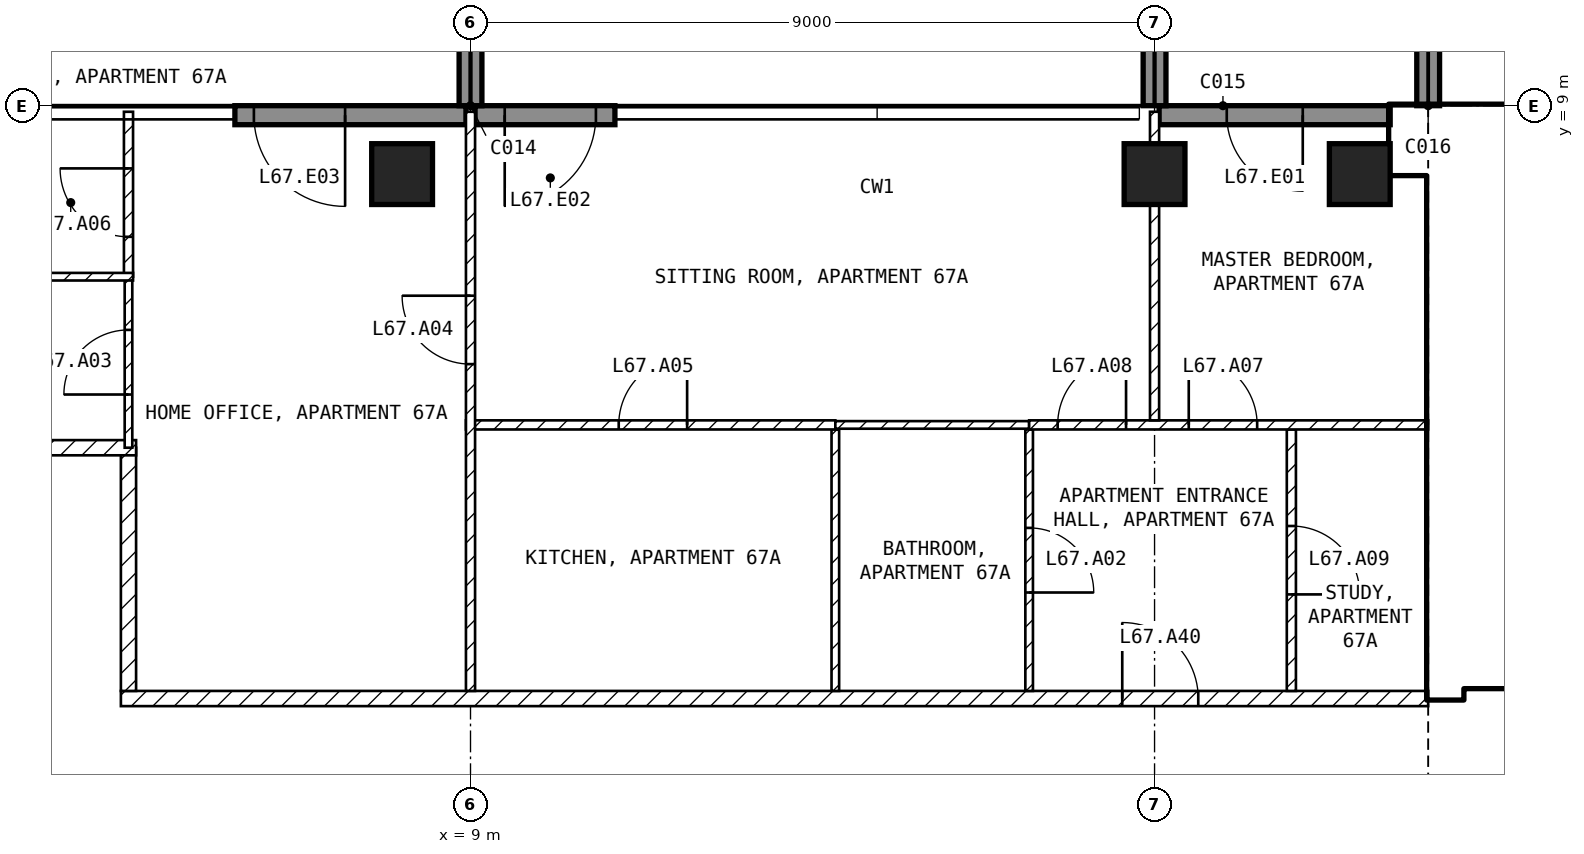
"""IFC4 building model, lengths in metres.
Left out: names, types, materials, properties, quantities, classifications, styles, units other than length and angle.
Written with IfcOpenShell. Run it as: python <this file> out.ifc"""

import sys

from ifc_helpers import new_model, si_unit, direction, frame, frame_2d, origin, origin_2d, place, context, subcontext, project, spatial, rectangle, extrude, element, fill, save


model = new_model("IFC4")
c1 = context("Model", 3, precision=1e-05, world=origin(), true_north=direction((0.0, 1.0)))
c2 = subcontext(c1, "Body", "Model", "MODEL_VIEW")
j1 = project(units=[si_unit("LENGTHUNIT", "METRE"), si_unit("PLANEANGLEUNIT", "RADIAN")], contexts=[c1])
p1 = place(None, origin())
s1 = spatial("IfcSite", under=j1, at=p1, CompositionType="ELEMENT")
p2 = place(p1, origin())
s2 = spatial("IfcBuilding", under=s1, at=p2, CompositionType="ELEMENT")
p3 = place(p2, frame((0.0, 0.0, 264.0)))
s3 = spatial("IfcBuildingStorey", under=s2, at=p3, CompositionType="ELEMENT", Elevation=264.0)
for number, where, z_axis, x_axis in (
    (1, (8.1, 8.1, -0.25), (0.0, 0.0, 1.0), (1.0, 0.0, 0.0)),
    (2, (18.0, 8.1, -0.25), (0.0, 0.0, 1.0), (1.0, 0.0, 0.0)),
    (3, (20.7, 8.1, -0.25), (0.0, 0.0, 1.0), (1.0, 0.0, 0.0)),
):
    element("IfcColumn", number, at=place(p3, frame(where, z_axis=z_axis, x_axis=x_axis)), inside=s3, PredefinedType="COLUMN", context=c2, shape_type="SweptSolid", body=[
        extrude(rectangle(XDim=0.8, YDim=0.8, at=origin_2d()), origin(), (0.0, 0.0, 1.0), 3.5),
    ])
p4 = place(p3, frame((21.1, 8.875, 0.0), z_axis=(0.0, 0.0, 1.0), x_axis=(-1.0, 0.0, 0.0)))
e4 = element("IfcWall", 4, at=p4, inside=s3, PredefinedType="SOLIDWALL", context=c2, shape_type="SweptSolid", body=[
    extrude(rectangle(XDim=3.04, YDim=0.25, at=frame_2d((1.52, 0.0))), origin(), (0.0, 0.0, 1.0), 3.25),
])
p5 = place(p4, frame((1.15, 0.0, 0.0)))
e5 = element("IfcOpeningElement", 5, at=p5, cuts=e4, PredefinedType="OPENING", context=c2, shape_type="SweptSolid", body=[
    extrude(rectangle(XDim=1.0, YDim=2.4, at=frame_2d((0.5, 1.2))), frame((0.0, 0.135, 0.0), z_axis=(0.0, -1.0, 0.0), x_axis=(1.0, 0.0, 0.0)), (0.0, 0.0, 1.0), 0.27),
])
p6 = place(p3, frame((10.9, 8.875, 0.0), z_axis=(0.0, 0.0, 1.0), x_axis=(-1.0, 0.0, 0.0)))
e6 = element("IfcWall", 6, at=p6, inside=s3, PredefinedType="SOLIDWALL", context=c2, shape_type="SweptSolid", body=[
    extrude(rectangle(XDim=1.84, YDim=0.25, at=frame_2d((0.92, 0.0))), origin(), (0.0, 0.0, 1.0), 3.25),
])
p7 = place(p6, frame((0.25, 0.0, 0.0)))
e7 = element("IfcOpeningElement", 7, at=p7, cuts=e6, PredefinedType="OPENING", context=c2, shape_type="SweptSolid", body=[
    extrude(rectangle(XDim=1.2, YDim=2.4, at=frame_2d((0.6, 1.2))), frame((0.0, 0.135, 0.0), z_axis=(0.0, -1.0, 0.0), x_axis=(1.0, 0.0, 0.0)), (0.0, 0.0, 1.0), 0.27),
])
p8 = place(p3, frame((8.94, 8.875, 0.0), z_axis=(0.0, 0.0, 1.0), x_axis=(-1.0, 0.0, 0.0)))
e8 = element("IfcWall", 8, at=p8, inside=s3, PredefinedType="SOLIDWALL", context=c2, shape_type="SweptSolid", body=[
    extrude(rectangle(XDim=3.04, YDim=0.25, at=frame_2d((1.52, 0.0))), origin(), (0.0, 0.0, 1.0), 3.25),
])
p9 = place(p8, frame((1.59, 0.0, 0.0)))
e9 = element("IfcOpeningElement", 9, at=p9, cuts=e8, PredefinedType="OPENING", context=c2, shape_type="SweptSolid", body=[
    extrude(rectangle(XDim=1.2, YDim=2.4, at=frame_2d((0.6, 1.2))), frame((0.0, 0.135, 0.0), z_axis=(0.0, -1.0, 0.0), x_axis=(1.0, 0.0, 0.0)), (0.0, 0.0, 1.0), 0.27),
])
for number, where, z_axis, x_axis in (
    (10, (9.0, 9.0, 0.0), (0.0, 0.0, 1.0), (0.0, 1.0, 0.0)),
    (11, (18.0, 9.0, 0.0), (0.0, 0.0, 1.0), (0.0, 1.0, 0.0)),
    (12, (21.6, 9.0, 0.0), (0.0, 0.0, 1.0), (0.0, 1.0, 0.0)),
):
    element("IfcWall", number, at=place(p3, frame(where, z_axis=z_axis, x_axis=x_axis)), inside=s3, PredefinedType="SOLIDWALL", context=c2, shape_type="SweptSolid", body=[
        extrude(rectangle(XDim=2.7, YDim=0.3, at=frame_2d((1.35, 0.0))), origin(), (0.0, 0.0, 1.0), 3.25),
    ])
p10 = place(p3, frame((21.1, 8.55, 0.0), z_axis=(0.0, 0.0, 1.0), x_axis=(1.0, 0.0, 0.0)))
e13 = element("IfcWall", 13, at=p10, inside=s3, PredefinedType="SHEAR", context=c2, shape_type="SweptSolid", body=[
    extrude(rectangle(XDim=8.65, YDim=0.9, at=frame_2d((4.325, 0.0))), origin(), (0.0, 0.0, 1.0), 3.25),
])
p11 = place(p3, frame((21.825, 1.2, 0.0), z_axis=(0.0, 0.0, 1.0), x_axis=(0.0, 1.0, 0.0)))
e14 = element("IfcWall", 14, at=p11, inside=s3, PredefinedType="SHEAR", context=c2, shape_type="SweptSolid", body=[
    extrude(rectangle(XDim=6.9, YDim=0.45, at=frame_2d((3.45, 0.0))), origin(), (0.0, 0.0, 1.0), 3.25),
])
p12 = place(p3, frame((22.05, 1.45, 0.0), z_axis=(0.0, 0.0, 1.0), x_axis=(1.0, 0.0, 0.0)))
e15 = element("IfcWall", 15, at=p12, inside=s3, PredefinedType="SOLIDWALL", context=c2, shape_type="SweptSolid", body=[
    extrude(rectangle(XDim=11.3, YDim=0.2, at=frame_2d((5.65, 0.0))), origin(), (0.0, 0.0, 1.0), 3.25),
])
p13 = place(p12, frame((0.75, 0.0, 0.0)))
e16 = element("IfcOpeningElement", 16, at=p13, cuts=e15, PredefinedType="OPENING", context=c2, shape_type="SweptSolid", body=[
    extrude(rectangle(XDim=1.0, YDim=2.1, at=frame_2d((0.5, 1.05))), frame((0.0, 0.11, 0.0), z_axis=(0.0, -1.0, 0.0), x_axis=(1.0, 0.0, 0.0)), (0.0, 0.0, 1.0), 0.22),
])
p14 = place(p12, frame((3.25, 0.0, 0.0)))
e17 = element("IfcOpeningElement", 17, at=p14, cuts=e15, PredefinedType="OPENING", context=c2, shape_type="SweptSolid", body=[
    extrude(rectangle(XDim=1.0, YDim=2.1, at=frame_2d((0.5, 1.05))), frame((0.0, 0.11, 0.0), z_axis=(0.0, -1.0, 0.0), x_axis=(1.0, 0.0, 0.0)), (0.0, 0.0, 1.0), 0.22),
])
p15 = place(p12, frame((9.225, 0.0, 0.0)))
e18 = element("IfcOpeningElement", 18, at=p15, cuts=e15, PredefinedType="OPENING", context=c2, shape_type="SweptSolid", body=[
    extrude(rectangle(XDim=0.9, YDim=2.1, at=frame_2d((0.45, 1.05))), frame((0.0, 0.11, 0.0), z_axis=(0.0, -1.0, 0.0), x_axis=(1.0, 0.0, 0.0)), (0.0, 0.0, 1.0), 0.22),
])
p16 = place(p3, frame((22.05, 5.15, 0.0), z_axis=(0.0, 0.0, 1.0), x_axis=(1.0, 0.0, 0.0)))
e19 = element("IfcWall", 19, at=p16, inside=s3, PredefinedType="SOLIDWALL", context=c2, shape_type="SweptSolid", body=[
    extrude(rectangle(XDim=6.3, YDim=0.2, at=frame_2d((3.15, 0.0))), origin(), (0.0, 0.0, 1.0), 3.25),
])
p17 = place(p16, frame((0.2, 0.0, 0.0)))
e20 = element("IfcOpeningElement", 20, at=p17, cuts=e19, PredefinedType="OPENING", context=c2, shape_type="SweptSolid", body=[
    extrude(rectangle(XDim=1.0, YDim=2.1, at=frame_2d((0.5, 1.05))), frame((0.0, 0.11, 0.0), z_axis=(0.0, -1.0, 0.0), x_axis=(1.0, 0.0, 0.0)), (0.0, 0.0, 1.0), 0.22),
])
p18 = place(p3, frame((4.4, 1.2, 0.0), z_axis=(0.0, 0.0, 1.0), x_axis=(1.0, 0.0, 0.0)))
e21 = element("IfcWall", 21, at=p18, inside=s3, PredefinedType="PARTITIONING", context=c2, shape_type="SweptSolid", body=[
    extrude(rectangle(XDim=17.2, YDim=0.2, at=frame_2d((8.6, 0.0))), origin(), (0.0, 0.0, 1.0), 3.25),
])
p19 = place(p18, frame((13.175, 0.0, 0.0)))
e22 = element("IfcOpeningElement", 22, at=p19, cuts=e21, PredefinedType="OPENING", context=c2, shape_type="SweptSolid", body=[
    extrude(rectangle(XDim=1.0, YDim=2.1, at=frame_2d((0.5, 1.05))), frame((0.0, 0.11, 0.0), z_axis=(0.0, -1.0, 0.0), x_axis=(1.0, 0.0, 0.0)), (0.0, 0.0, 1.0), 0.22),
])
p20 = place(p3, frame((4.5, 4.5, 0.0), z_axis=(0.0, 0.0, 1.0), x_axis=(0.0, -1.0, 0.0)))
e23 = element("IfcWall", 23, at=p20, inside=s3, PredefinedType="PARTITIONING", context=c2, shape_type="SweptSolid", body=[
    extrude(rectangle(XDim=3.2, YDim=0.2, at=frame_2d((1.6, 0.0))), origin(), (0.0, 0.0, 1.0), 3.25),
])
p21 = place(p3, frame((1.1, 4.5, 0.0), z_axis=(0.0, 0.0, 1.0), x_axis=(1.0, 0.0, 0.0)))
e24 = element("IfcWall", 24, at=p21, inside=s3, PredefinedType="PARTITIONING", context=c2, shape_type="SweptSolid", body=[
    extrude(rectangle(XDim=3.5, YDim=0.2, at=frame_2d((1.75, 0.0))), origin(), (0.0, 0.0, 1.0), 3.25),
])
p22 = place(p3, frame((13.8, 4.74, 0.0), z_axis=(0.0, 0.0, 1.0), x_axis=(0.0, -1.0, 0.0)))
e25 = element("IfcWall", 25, at=p22, inside=s3, PredefinedType="PARTITIONING", context=c2, shape_type="SweptSolid", body=[
    extrude(rectangle(XDim=3.44, YDim=0.1, at=frame_2d((1.72, 0.0))), origin(), (0.0, 0.0, 1.0), 3.25),
])
p23 = place(p3, frame((8.94, 4.8, 0.0), z_axis=(0.0, 0.0, 1.0), x_axis=(1.0, 0.0, 0.0)))
e26 = element("IfcWall", 26, at=p23, inside=s3, PredefinedType="PARTITIONING", context=c2, shape_type="SweptSolid", body=[
    extrude(rectangle(XDim=4.86, YDim=0.12, at=frame_2d((2.43, 0.0))), origin(), (0.0, 0.0, 1.0), 3.25),
])
p24 = place(p23, frame((2.01, 0.0, 0.0)))
e27 = element("IfcOpeningElement", 27, at=p24, cuts=e26, PredefinedType="OPENING", context=c2, shape_type="SweptSolid", body=[
    extrude(rectangle(XDim=0.9, YDim=2.1, at=frame_2d((0.45, 1.05))), frame((0.0, 0.07, 0.0), z_axis=(0.0, -1.0, 0.0), x_axis=(1.0, 0.0, 0.0)), (0.0, 0.0, 1.0), 0.14),
])
p25 = place(p3, frame((9.0, 1.3, 0.0), z_axis=(0.0, 0.0, 1.0), x_axis=(0.0, 1.0, 0.0)))
e28 = element("IfcWall", 28, at=p25, inside=s3, PredefinedType="PARTITIONING", context=c2, shape_type="SweptSolid", body=[
    extrude(rectangle(XDim=7.62, YDim=0.12, at=frame_2d((3.81, 0.0))), origin(), (0.0, 0.0, 1.0), 3.25),
])
p26 = place(p25, frame((4.3, 0.0, 0.0)))
e29 = element("IfcOpeningElement", 29, at=p26, cuts=e28, PredefinedType="OPENING", context=c2, shape_type="SweptSolid", body=[
    extrude(rectangle(XDim=0.9, YDim=2.1, at=frame_2d((0.45, 1.05))), frame((0.0, 0.07, 0.0), z_axis=(0.0, -1.0, 0.0), x_axis=(1.0, 0.0, 0.0)), (0.0, 0.0, 1.0), 0.14),
])
p27 = place(p3, frame((16.35, 4.74, 0.0), z_axis=(0.0, 0.0, 1.0), x_axis=(0.0, -1.0, 0.0)))
e30 = element("IfcWall", 30, at=p27, inside=s3, PredefinedType="PARTITIONING", context=c2, shape_type="SweptSolid", body=[
    extrude(rectangle(XDim=3.44, YDim=0.1, at=frame_2d((1.72, 0.0))), origin(), (0.0, 0.0, 1.0), 3.25),
])
p28 = place(p27, frame((1.295, 0.0, 0.0)))
e31 = element("IfcOpeningElement", 31, at=p28, cuts=e30, PredefinedType="OPENING", context=c2, shape_type="SweptSolid", body=[
    extrude(rectangle(XDim=0.85, YDim=2.1, at=frame_2d((0.425, 1.05))), frame((0.0, 0.06, 0.0), z_axis=(0.0, -1.0, 0.0), x_axis=(1.0, 0.0, 0.0)), (0.0, 0.0, 1.0), 0.12),
])
p29 = place(p3, frame((13.8, 4.8, 0.0), z_axis=(0.0, 0.0, 1.0), x_axis=(1.0, 0.0, 0.0)))
e32 = element("IfcWall", 32, at=p29, inside=s3, PredefinedType="PARTITIONING", context=c2, shape_type="SweptSolid", body=[
    extrude(rectangle(XDim=2.55, YDim=0.1, at=frame_2d((1.275, 0.0))), origin(), (0.0, 0.0, 1.0), 3.25),
])
p30 = place(p3, frame((19.8, 4.74, 0.0), z_axis=(0.0, 0.0, 1.0), x_axis=(0.0, -1.0, 0.0)))
e33 = element("IfcWall", 33, at=p30, inside=s3, PredefinedType="PARTITIONING", context=c2, shape_type="SweptSolid", body=[
    extrude(rectangle(XDim=3.44, YDim=0.12, at=frame_2d((1.72, 0.0))), origin(), (0.0, 0.0, 1.0), 3.25),
])
p31 = place(p30, frame((1.27, 0.0, 0.0)))
e34 = element("IfcOpeningElement", 34, at=p31, cuts=e33, PredefinedType="OPENING", context=c2, shape_type="SweptSolid", body=[
    extrude(rectangle(XDim=0.9, YDim=2.1, at=frame_2d((0.45, 1.05))), frame((0.0, 0.07, 0.0), z_axis=(0.0, -1.0, 0.0), x_axis=(1.0, 0.0, 0.0)), (0.0, 0.0, 1.0), 0.14),
])
p32 = place(p3, frame((16.35, 4.8, 0.0), z_axis=(0.0, 0.0, 1.0), x_axis=(1.0, 0.0, 0.0)))
e35 = element("IfcWall", 35, at=p32, inside=s3, PredefinedType="PARTITIONING", context=c2, shape_type="SweptSolid", body=[
    extrude(rectangle(XDim=5.25, YDim=0.12, at=frame_2d((2.625, 0.0))), origin(), (0.0, 0.0, 1.0), 3.25),
])
p33 = place(p32, frame((2.1, 0.0, 0.0)))
e36 = element("IfcOpeningElement", 36, at=p33, cuts=e35, PredefinedType="OPENING", context=c2, shape_type="SweptSolid", body=[
    extrude(rectangle(XDim=0.9, YDim=2.1, at=frame_2d((0.45, 1.05))), frame((0.0, 0.07, 0.0), z_axis=(0.0, -1.0, 0.0), x_axis=(1.0, 0.0, 0.0)), (0.0, 0.0, 1.0), 0.14),
])
p34 = place(p32, frame((0.375, 0.0, 0.0)))
e37 = element("IfcOpeningElement", 37, at=p34, cuts=e35, PredefinedType="OPENING", context=c2, shape_type="SweptSolid", body=[
    extrude(rectangle(XDim=0.9, YDim=2.1, at=frame_2d((0.45, 1.05))), frame((0.0, 0.07, 0.0), z_axis=(0.0, -1.0, 0.0), x_axis=(1.0, 0.0, 0.0)), (0.0, 0.0, 1.0), 0.14),
])
p35 = place(p3, frame((18.0, 8.92, 0.0), z_axis=(0.0, 0.0, 1.0), x_axis=(0.0, -1.0, 0.0)))
e38 = element("IfcWall", 38, at=p35, inside=s3, PredefinedType="PARTITIONING", context=c2, shape_type="SweptSolid", body=[
    extrude(rectangle(XDim=4.06, YDim=0.12, at=frame_2d((2.03, 0.0))), origin(), (0.0, 0.0, 1.0), 2.496),
])
p36 = place(p3, frame((4.5, 4.5, 0.0), z_axis=(0.0, 0.0, 1.0), x_axis=(0.0, 1.0, 0.0)))
e39 = element("IfcWall", 39, at=p36, inside=s3, PredefinedType="PARTITIONING", context=c2, shape_type="SweptSolid", body=[
    extrude(rectangle(XDim=2.25, YDim=0.1, at=frame_2d((1.125, 0.0))), origin(), (0.0, 0.0, 1.0), 3.25),
])
p37 = place(p36, frame((0.7, 0.0, 0.0)))
e40 = element("IfcOpeningElement", 40, at=p37, cuts=e39, PredefinedType="OPENING", context=c2, shape_type="SweptSolid", body=[
    extrude(rectangle(XDim=0.85, YDim=2.1, at=frame_2d((0.425, 1.05))), frame((0.0, 0.06, 0.0), z_axis=(0.0, -1.0, 0.0), x_axis=(1.0, 0.0, 0.0)), (0.0, 0.0, 1.0), 0.12),
])
p38 = place(p3, frame((4.5, 6.75, 0.0), z_axis=(0.0, 0.0, 1.0), x_axis=(0.0, 1.0, 0.0)))
e41 = element("IfcWall", 41, at=p38, inside=s3, PredefinedType="PARTITIONING", context=c2, shape_type="SweptSolid", body=[
    extrude(rectangle(XDim=2.17, YDim=0.12, at=frame_2d((1.085, 0.0))), origin(), (0.0, 0.0, 1.0), 3.25),
])
p39 = place(p38, frame((0.525, 0.0, 0.0)))
e42 = element("IfcOpeningElement", 42, at=p39, cuts=e41, PredefinedType="OPENING", context=c2, shape_type="SweptSolid", body=[
    extrude(rectangle(XDim=0.9, YDim=2.1, at=frame_2d((0.45, 1.05))), frame((0.0, 0.07, 0.0), z_axis=(0.0, -1.0, 0.0), x_axis=(1.0, 0.0, 0.0)), (0.0, 0.0, 1.0), 0.14),
])
p40 = place(p3, frame((1.1, 6.75, 0.0), z_axis=(0.0, 0.0, 1.0), x_axis=(1.0, 0.0, 0.0)))
e43 = element("IfcWall", 43, at=p40, inside=s3, PredefinedType="PARTITIONING", context=c2, shape_type="SweptSolid", body=[
    extrude(rectangle(XDim=3.46, YDim=0.1, at=frame_2d((1.73, 0.0))), origin(), (0.0, 0.0, 1.0), 3.25),
])
p41 = place(p5, origin())
e44 = element("IfcDoor", 44, at=p41, inside=s3, OperationType="SINGLE_SWING_LEFT", PredefinedType="DOOR", context=c2, shape_type="SweptSolid", body=[
    extrude(rectangle(XDim=1.0, YDim=2.4, at=frame_2d((0.5, 1.2))), frame((0.0, 0.025, 0.0), z_axis=(0.0, -1.0, 0.0), x_axis=(1.0, 0.0, 0.0)), (0.0, 0.0, 1.0), 0.05),
])
fill(e5, e44)
p42 = place(p7, origin())
e45 = element("IfcDoor", 45, at=p42, inside=s3, OperationType="SINGLE_SWING_RIGHT", PredefinedType="DOOR", context=c2, shape_type="SweptSolid", body=[
    extrude(rectangle(XDim=1.2, YDim=2.4, at=frame_2d((0.6, 1.2))), frame((0.0, 0.025, 0.0), z_axis=(0.0, -1.0, 0.0), x_axis=(1.0, 0.0, 0.0)), (0.0, 0.0, 1.0), 0.05),
])
fill(e7, e45)
p43 = place(p9, origin())
e46 = element("IfcDoor", 46, at=p43, inside=s3, OperationType="SINGLE_SWING_LEFT", PredefinedType="DOOR", context=c2, shape_type="SweptSolid", body=[
    extrude(rectangle(XDim=1.2, YDim=2.4, at=frame_2d((0.6, 1.2))), frame((0.0, 0.025, 0.0), z_axis=(0.0, -1.0, 0.0), x_axis=(1.0, 0.0, 0.0)), (0.0, 0.0, 1.0), 0.05),
])
fill(e9, e46)
p44 = place(p17, origin())
e47 = element("IfcDoor", 47, at=p44, inside=s3, OperationType="SINGLE_SWING_LEFT", PredefinedType="DOOR", context=c2, shape_type="SweptSolid", body=[
    extrude(rectangle(XDim=1.0, YDim=2.1, at=frame_2d((0.5, 1.05))), frame((0.0, 0.025, 0.0), z_axis=(0.0, -1.0, 0.0), x_axis=(1.0, 0.0, 0.0)), (0.0, 0.0, 1.0), 0.05),
])
fill(e20, e47)
p45 = place(p28, origin())
e48 = element("IfcDoor", 48, at=p45, inside=s3, OperationType="SINGLE_SWING_RIGHT", PredefinedType="DOOR", context=c2, shape_type="SweptSolid", body=[
    extrude(rectangle(XDim=0.85, YDim=2.1, at=frame_2d((0.425, 1.05))), frame((0.0, 0.025, 0.0), z_axis=(0.0, -1.0, 0.0), x_axis=(1.0, 0.0, 0.0)), (0.0, 0.0, 1.0), 0.05),
])
fill(e31, e48)
p46 = place(p37, origin())
e49 = element("IfcDoor", 49, at=p46, inside=s3, OperationType="SINGLE_SWING_LEFT", PredefinedType="DOOR", context=c2, shape_type="SweptSolid", body=[
    extrude(rectangle(XDim=0.85, YDim=2.1, at=frame_2d((0.425, 1.05))), frame((0.0, 0.025, 0.0), z_axis=(0.0, -1.0, 0.0), x_axis=(1.0, 0.0, 0.0)), (0.0, 0.0, 1.0), 0.05),
])
fill(e40, e49)
p47 = place(p26, origin())
e50 = element("IfcDoor", 50, at=p47, inside=s3, OperationType="SINGLE_SWING_RIGHT", PredefinedType="DOOR", context=c2, shape_type="SweptSolid", body=[
    extrude(rectangle(XDim=0.9, YDim=2.1, at=frame_2d((0.45, 1.05))), frame((0.0, 0.025, 0.0), z_axis=(0.0, -1.0, 0.0), x_axis=(1.0, 0.0, 0.0)), (0.0, 0.0, 1.0), 0.05),
])
fill(e29, e50)
p48 = place(p24, origin())
e51 = element("IfcDoor", 51, at=p48, inside=s3, OperationType="SINGLE_SWING_RIGHT", PredefinedType="DOOR", context=c2, shape_type="SweptSolid", body=[
    extrude(rectangle(XDim=0.9, YDim=2.1, at=frame_2d((0.45, 1.05))), frame((0.0, 0.025, 0.0), z_axis=(0.0, -1.0, 0.0), x_axis=(1.0, 0.0, 0.0)), (0.0, 0.0, 1.0), 0.05),
])
fill(e27, e51)
p49 = place(p39, origin())
e52 = element("IfcDoor", 52, at=p49, inside=s3, OperationType="SINGLE_SWING_RIGHT", PredefinedType="DOOR", context=c2, shape_type="SweptSolid", body=[
    extrude(rectangle(XDim=0.9, YDim=2.1, at=frame_2d((0.45, 1.05))), frame((0.0, 0.025, 0.0), z_axis=(0.0, -1.0, 0.0), x_axis=(1.0, 0.0, 0.0)), (0.0, 0.0, 1.0), 0.05),
])
fill(e42, e52)
p50 = place(p33, origin())
e53 = element("IfcDoor", 53, at=p50, inside=s3, OperationType="SINGLE_SWING_LEFT", PredefinedType="DOOR", context=c2, shape_type="SweptSolid", body=[
    extrude(rectangle(XDim=0.9, YDim=2.1, at=frame_2d((0.45, 1.05))), frame((0.0, 0.025, 0.0), z_axis=(0.0, -1.0, 0.0), x_axis=(1.0, 0.0, 0.0)), (0.0, 0.0, 1.0), 0.05),
])
fill(e36, e53)
p51 = place(p34, origin())
e54 = element("IfcDoor", 54, at=p51, inside=s3, OperationType="SINGLE_SWING_RIGHT", PredefinedType="DOOR", context=c2, shape_type="SweptSolid", body=[
    extrude(rectangle(XDim=0.9, YDim=2.1, at=frame_2d((0.45, 1.05))), frame((0.0, 0.025, 0.0), z_axis=(0.0, -1.0, 0.0), x_axis=(1.0, 0.0, 0.0)), (0.0, 0.0, 1.0), 0.05),
])
fill(e37, e54)
p52 = place(p31, origin())
e55 = element("IfcDoor", 55, at=p52, inside=s3, OperationType="SINGLE_SWING_RIGHT", PredefinedType="DOOR", context=c2, shape_type="SweptSolid", body=[
    extrude(rectangle(XDim=0.9, YDim=2.1, at=frame_2d((0.45, 1.05))), frame((0.0, 0.025, 0.0), z_axis=(0.0, -1.0, 0.0), x_axis=(1.0, 0.0, 0.0)), (0.0, 0.0, 1.0), 0.05),
])
fill(e34, e55)
p53 = place(p19, origin())
e56 = element("IfcDoor", 56, at=p53, inside=s3, OperationType="SINGLE_SWING_LEFT", PredefinedType="DOOR", context=c2, shape_type="SweptSolid", body=[
    extrude(rectangle(XDim=1.0, YDim=2.1, at=frame_2d((0.5, 1.05))), frame((0.0, 0.025, 0.0), z_axis=(0.0, -1.0, 0.0), x_axis=(1.0, 0.0, 0.0)), (0.0, 0.0, 1.0), 0.05),
])
fill(e22, e56)
save(model, sys.argv[1])
